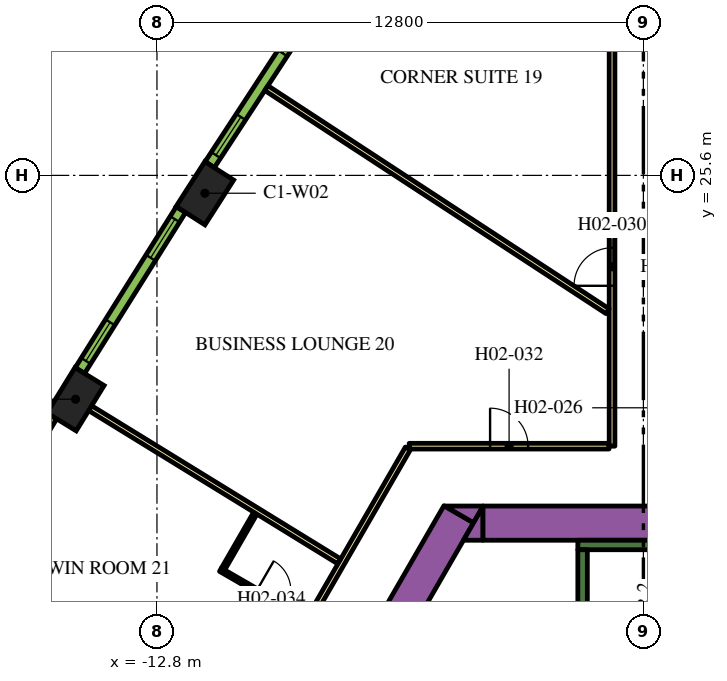
"""IFC4 building model, lengths in metres.
Left out: names, types, materials, properties, quantities, classifications, styles, units other than length and angle.
Written with IfcOpenShell. Run it as: python <this file> out.ifc"""

import sys

from ifc_helpers import new_model, si_unit, direction, frame, frame_2d, origin, origin_2d, place, context, subcontext, project, spatial, polyline, rectangle, outline, extrude, element, fill, save


model = new_model("IFC4")
c1 = context("Model", 3, precision=1e-05, world=origin(), true_north=direction((0.0, 1.0)))
c2 = subcontext(c1, "Body", "Model", "MODEL_VIEW")
j1 = project(units=[si_unit("LENGTHUNIT", "METRE"), si_unit("PLANEANGLEUNIT", "RADIAN")], contexts=[c1])
p1 = place(None, origin())
s1 = spatial("IfcSite", under=j1, at=p1, CompositionType="ELEMENT")
p2 = place(p1, origin())
s2 = spatial("IfcBuilding", under=s1, at=p2, CompositionType="ELEMENT")
p3 = place(p2, frame((0.0, 0.0, 47.1)))
s3 = spatial("IfcBuildingStorey", under=s2, at=p3, CompositionType="ELEMENT", Elevation=47.1)
for number, where, z_axis, x_axis in (
    (1, (-11.539, 25.131, 0.0), (0.0, 0.0, 1.0), (-0.539, -0.842, 0.0)),
    (2, (-14.942, 19.71, 0.0), (0.0, 0.0, 1.0), (-0.524, -0.852, 0.0)),
):
    element("IfcColumn", number, at=place(p3, frame(where, z_axis=z_axis, x_axis=x_axis)), inside=s3, PredefinedType="COLUMN", context=c2, shape_type="SweptSolid", body=[
        extrude(rectangle(XDim=1.4, YDim=0.9, at=origin_2d()), origin(), (0.0, 0.0, 1.0), 3.9),
    ])
p4 = place(p3, frame((-15.36, -1.503, 0.0), z_axis=(0.0, 0.0, 1.0), x_axis=(0.50000389221, 0.866023156604, 0.0)))
e3 = element("IfcWall", 3, at=p4, inside=s3, PredefinedType="SOLIDWALL", context=c2, shape_type="SweptSolid", body=[
    extrude(rectangle(XDim=21.0, YDim=0.9, at=frame_2d((10.5, 0.0))), origin(), (0.0, 0.0, 1.0), 3.9),
])
p5 = place(p3, origin())
e4 = element("IfcWall", 4, at=p5, inside=s3, PredefinedType="SOLIDWALL", context=c2, shape_type="SweptSolid", body=[
    extrude(outline(polyline([(-4.215, 16.9), (-4.469, 16.46), (-5.231, 16.9), (-4.215, 16.9)])), origin(), (0.0, 0.0, 1.0), 3.9),
])
p6 = place(p3, frame((-4.224, 16.45, 0.0), z_axis=(0.0, 0.0, 1.0), x_axis=(1.0, 0.0, 0.0)))
e5 = element("IfcWall", 5, at=p6, inside=s3, PredefinedType="SOLIDWALL", context=c2, shape_type="SweptSolid", body=[
    extrude(rectangle(XDim=9.488, YDim=0.9, at=frame_2d((4.744, 0.0))), origin(), (0.0, 0.0, 1.0), 3.9),
])
e6 = element("IfcWall", 6, at=p5, inside=s3, PredefinedType="SOLIDWALL", context=c2, shape_type="SweptSolid", body=[
    extrude(outline(polyline([(-4.734, 16.0), (-4.226, 16.88), (-4.226, 16.0), (-4.734, 16.0)])), origin(), (0.0, 0.0, 1.0), 3.9),
])
p7 = place(p3, frame((-1.725, 15.875, 0.0), z_axis=(0.0, 0.0, 1.0), x_axis=(1.0, 0.0, 0.0)))
e7 = element("IfcWall", 7, at=p7, inside=s3, PredefinedType="SOLIDWALL", context=c2, shape_type="SweptSolid", body=[
    extrude(rectangle(XDim=3.45, YDim=0.25, at=frame_2d((1.725, 0.0))), origin(), (0.0, 0.0, 1.0), 3.9),
])
p8 = place(p3, frame((-1.6, 8.7, 0.0), z_axis=(0.0, 0.0, 1.0), x_axis=(0.0, 1.0, 0.0)))
e8 = element("IfcWall", 8, at=p8, inside=s3, PredefinedType="SOLIDWALL", context=c2, shape_type="SweptSolid", body=[
    extrude(rectangle(XDim=7.05, YDim=0.25, at=frame_2d((3.525, 0.0))), origin(), (0.0, 0.0, 1.0), 3.9),
])
p9 = place(p3, frame((-0.825, 18.475, 0.0), z_axis=(0.0, 0.0, 1.0), x_axis=(0.0, 1.0, 0.0)))
e9 = element("IfcWall", 9, at=p9, inside=s3, PredefinedType="PARTITIONING", context=c2, shape_type="SweptSolid", body=[
    extrude(rectangle(XDim=16.224, YDim=0.15, at=frame_2d((8.112, 0.0))), origin(), (0.0, 0.0, 1.0), 2.75),
])
p10 = place(p9, frame((4.22, 0.0, 0.0)))
e10 = element("IfcOpeningElement", 10, at=p10, cuts=e9, PredefinedType="OPENING", context=c2, shape_type="SweptSolid", body=[
    extrude(rectangle(XDim=1.0, YDim=2.1, at=frame_2d((0.5, 1.05))), frame((0.0, 0.085, 0.0), z_axis=(0.0, -1.0, 0.0), x_axis=(1.0, 0.0, 0.0)), (0.0, 0.0, 1.0), 0.17),
])
p11 = place(p3, frame((-6.163, 18.475, 0.0), z_axis=(0.0, 0.0, 1.0), x_axis=(1.0, 0.0, 0.0)))
e11 = element("IfcWall", 11, at=p11, inside=s3, PredefinedType="PARTITIONING", context=c2, shape_type="SweptSolid", body=[
    extrude(rectangle(XDim=5.258, YDim=0.15, at=frame_2d((2.629, 0.0))), origin(), (0.0, 0.0, 1.0), 2.75),
])
p12 = place(p11, frame((2.129, 0.0, 0.0)))
e12 = element("IfcOpeningElement", 12, at=p12, cuts=e11, PredefinedType="OPENING", context=c2, shape_type="SweptSolid", body=[
    extrude(rectangle(XDim=1.0, YDim=2.1, at=frame_2d((0.5, 1.05))), frame((0.0, 0.085, 0.0), z_axis=(0.0, -1.0, 0.0), x_axis=(1.0, 0.0, 0.0)), (0.0, 0.0, 1.0), 0.17),
])
p13 = place(p3, frame((-19.081, -3.9, 0.0), z_axis=(0.0, 0.0, 1.0), x_axis=(0.499998313975, 0.866026377209, 0.0)))
e13 = element("IfcWall", 13, at=p13, inside=s3, PredefinedType="PARTITIONING", context=c2, shape_type="SweptSolid", body=[
    extrude(rectangle(XDim=25.766, YDim=0.15, at=frame_2d((12.883, 0.0))), origin(), (0.0, 0.0, 1.0), 2.75),
])
p14 = place(p13, frame((16.196, 0.0, 0.0)))
e14 = element("IfcOpeningElement", 14, at=p14, cuts=e13, PredefinedType="OPENING", context=c2, shape_type="SweptSolid", body=[
    extrude(rectangle(XDim=1.0, YDim=2.1, at=frame_2d((0.5, 1.05))), frame((0.0, 0.085, 0.0), z_axis=(0.0, -1.0, 0.0), x_axis=(1.0, 0.0, 0.0)), (0.0, 0.0, 1.0), 0.17),
])
p15 = place(p13, frame((14.889, 0.0, 0.0)))
e15 = element("IfcOpeningElement", 15, at=p15, cuts=e13, PredefinedType="OPENING", context=c2, shape_type="SweptSolid", body=[
    extrude(rectangle(XDim=1.0, YDim=2.1, at=frame_2d((0.5, 1.05))), frame((0.0, 0.085, 0.0), z_axis=(0.0, -1.0, 0.0), x_axis=(1.0, 0.0, 0.0)), (0.0, 0.0, 1.0), 0.17),
])
p16 = place(p13, frame((3.698, 0.0, 0.0)))
e16 = element("IfcOpeningElement", 16, at=p16, cuts=e13, PredefinedType="OPENING", context=c2, shape_type="SweptSolid", body=[
    extrude(rectangle(XDim=1.1, YDim=2.1, at=frame_2d((0.55, 1.05))), frame((0.0, 0.085, 0.0), z_axis=(0.0, -1.0, 0.0), x_axis=(1.0, 0.0, 0.0)), (0.0, 0.0, 1.0), 0.17),
])
p17 = place(p13, frame((2.392, 0.0, 0.0)))
e17 = element("IfcOpeningElement", 17, at=p17, cuts=e13, PredefinedType="OPENING", context=c2, shape_type="SweptSolid", body=[
    extrude(rectangle(XDim=1.0, YDim=2.1, at=frame_2d((0.5, 1.05))), frame((0.0, 0.085, 0.0), z_axis=(0.0, -1.0, 0.0), x_axis=(1.0, 0.0, 0.0)), (0.0, 0.0, 1.0), 0.17),
])
p18 = place(p3, frame((-14.558, 19.475, 0.0), z_axis=(0.0, 0.0, 1.0), x_axis=(0.851829455142, -0.523819223925, 0.0)))
e18 = element("IfcWall", 18, at=p18, inside=s3, PredefinedType="PARTITIONING", context=c2, shape_type="SweptSolid", body=[
    extrude(rectangle(XDim=7.688, YDim=0.15, at=frame_2d((3.844, 0.0))), origin(), (0.0, 0.0, 1.0), 2.75),
])
p19 = place(p3, frame((-9.922, 27.896, 0.0), z_axis=(0.0, 0.0, 1.0), x_axis=(0.836970816595, -0.547247523675, 0.0)))
e19 = element("IfcWall", 19, at=p19, inside=s3, PredefinedType="PARTITIONING", context=c2, shape_type="SweptSolid", body=[
    extrude(rectangle(XDim=10.729, YDim=0.15, at=frame_2d((5.364, 0.0))), origin(), (0.0, 0.0, 1.0), 2.75),
])
p20 = place(p3, frame((-11.129, 15.224, 0.0), z_axis=(0.0, 0.0, 1.0), x_axis=(0.866021400173, -0.500006934395, 0.0)))
e20 = element("IfcWall", 20, at=p20, inside=s3, PredefinedType="PARTITIONING", context=c2, shape_type="SweptSolid", body=[
    extrude(rectangle(XDim=2.6, YDim=0.1, at=frame_2d((1.3, 0.0))), origin(), (0.0, 0.0, 1.0), 2.75),
])
p21 = place(p20, frame((1.1, 0.0, 0.0)))
e21 = element("IfcOpeningElement", 21, at=p21, cuts=e20, PredefinedType="OPENING", context=c2, shape_type="SweptSolid", body=[
    extrude(rectangle(XDim=0.9, YDim=2.1, at=frame_2d((0.45, 1.05))), frame((0.0, 0.06, 0.0), z_axis=(0.0, -1.0, 0.0), x_axis=(1.0, 0.0, 0.0)), (0.0, 0.0, 1.0), 0.12),
])
p22 = place(p3, frame((-11.061, 15.242, 0.0), z_axis=(0.0, 0.0, 1.0), x_axis=(0.499976720371, 0.866038843867, 0.0)))
e22 = element("IfcWall", 22, at=p22, inside=s3, PredefinedType="PARTITIONING", context=c2, shape_type="SweptSolid", body=[
    extrude(rectangle(XDim=1.69, YDim=0.1, at=frame_2d((0.845, 0.0))), origin(), (0.0, 0.0, 1.0), 2.75),
])
p23 = place(p3, frame((-8.676, 30.068, 0.0), z_axis=(0.0, 0.0, 1.0), x_axis=(-0.547204617628, -0.836998868845, 0.0)))
e23 = element("IfcWall", 23, at=p23, inside=s3, PredefinedType="SOLIDWALL", context=c2, shape_type="SweptSolid", body=[
    extrude(rectangle(XDim=4.998, YDim=0.29, at=frame_2d((2.499, 0.0))), origin(), (0.0, 0.0, 1.0), 3.65),
])
p24 = place(p23, frame((0.297, 0.0, 0.9)))
e24 = element("IfcOpeningElement", 24, at=p24, cuts=e23, PredefinedType="OPENING", context=c2, shape_type="SweptSolid", body=[
    extrude(rectangle(XDim=1.2, YDim=2.15, at=frame_2d((0.6, 1.075))), frame((0.0, 0.155, 0.0), z_axis=(0.0, -1.0, 0.0), x_axis=(1.0, 0.0, 0.0)), (0.0, 0.0, 1.0), 0.31),
])
p25 = place(p23, frame((3.501, 0.0, 0.9)))
e25 = element("IfcOpeningElement", 25, at=p25, cuts=e23, PredefinedType="OPENING", context=c2, shape_type="SweptSolid", body=[
    extrude(rectangle(XDim=1.2, YDim=2.15, at=frame_2d((0.6, 1.075))), frame((0.0, 0.155, 0.0), z_axis=(0.0, -1.0, 0.0), x_axis=(1.0, 0.0, 0.0)), (0.0, 0.0, 1.0), 0.31),
])
p26 = place(p3, frame((-12.17, 24.699, 0.0), z_axis=(0.0, 0.0, 1.0), x_axis=(-0.531688286542, -0.846940119462, 0.0)))
e26 = element("IfcWall", 26, at=p26, inside=s3, PredefinedType="SOLIDWALL", context=c2, shape_type="SweptSolid", body=[
    extrude(rectangle(XDim=4.998, YDim=0.29, at=frame_2d((2.499, 0.0))), origin(), (0.0, 0.0, 1.0), 3.65),
])
p27 = place(p26, frame((0.297, 0.0, 0.9)))
e27 = element("IfcOpeningElement", 27, at=p27, cuts=e26, PredefinedType="OPENING", context=c2, shape_type="SweptSolid", body=[
    extrude(rectangle(XDim=1.2, YDim=2.15, at=frame_2d((0.6, 1.075))), frame((0.0, 0.155, 0.0), z_axis=(0.0, -1.0, 0.0), x_axis=(1.0, 0.0, 0.0)), (0.0, 0.0, 1.0), 0.31),
])
p28 = place(p26, frame((3.501, 0.0, 0.9)))
e28 = element("IfcOpeningElement", 28, at=p28, cuts=e26, PredefinedType="OPENING", context=c2, shape_type="SweptSolid", body=[
    extrude(rectangle(XDim=1.2, YDim=2.15, at=frame_2d((0.6, 1.075))), frame((0.0, 0.155, 0.0), z_axis=(0.0, -1.0, 0.0), x_axis=(1.0, 0.0, 0.0)), (0.0, 0.0, 1.0), 0.31),
])
p29 = place(p3, frame((-15.564, 19.267, 0.0), z_axis=(0.0, 0.0, 1.0), x_axis=(-0.515938796285, -0.856625448191, 0.0)))
e29 = element("IfcWall", 29, at=p29, inside=s3, PredefinedType="SOLIDWALL", context=c2, shape_type="SweptSolid", body=[
    extrude(rectangle(XDim=4.998, YDim=0.29, at=frame_2d((2.499, 0.0))), origin(), (0.0, 0.0, 1.0), 3.65),
])
p30 = place(p29, frame((0.297, 0.0, 0.9)))
e30 = element("IfcOpeningElement", 30, at=p30, cuts=e29, PredefinedType="OPENING", context=c2, shape_type="SweptSolid", body=[
    extrude(rectangle(XDim=1.2, YDim=2.15, at=frame_2d((0.6, 1.075))), frame((0.0, 0.155, 0.0), z_axis=(0.0, -1.0, 0.0), x_axis=(1.0, 0.0, 0.0)), (0.0, 0.0, 1.0), 0.31),
])
p31 = place(p29, frame((3.501, 0.0, 0.9)))
e31 = element("IfcOpeningElement", 31, at=p31, cuts=e29, PredefinedType="OPENING", context=c2, shape_type="SweptSolid", body=[
    extrude(rectangle(XDim=1.2, YDim=2.15, at=frame_2d((0.6, 1.075))), frame((0.0, 0.155, 0.0), z_axis=(0.0, -1.0, 0.0), x_axis=(1.0, 0.0, 0.0)), (0.0, 0.0, 1.0), 0.31),
])
p32 = place(p10, origin())
e32 = element("IfcDoor", 32, at=p32, inside=s3, OperationType="SINGLE_SWING_LEFT", PredefinedType="DOOR", context=c2, shape_type="SweptSolid", body=[
    extrude(rectangle(XDim=1.0, YDim=2.1, at=frame_2d((0.5, 1.05))), frame((0.0, 0.025, 0.0), z_axis=(0.0, -1.0, 0.0), x_axis=(1.0, 0.0, 0.0)), (0.0, 0.0, 1.0), 0.05),
])
fill(e10, e32)
p33 = place(p12, origin())
e33 = element("IfcDoor", 33, at=p33, inside=s3, OperationType="SINGLE_SWING_RIGHT", PredefinedType="DOOR", context=c2, shape_type="SweptSolid", body=[
    extrude(rectangle(XDim=1.0, YDim=2.1, at=frame_2d((0.5, 1.05))), frame((0.0, 0.025, 0.0), z_axis=(0.0, -1.0, 0.0), x_axis=(1.0, 0.0, 0.0)), (0.0, 0.0, 1.0), 0.05),
])
fill(e12, e33)
p34 = place(p21, origin())
e34 = element("IfcDoor", 34, at=p34, inside=s3, OperationType="SINGLE_SWING_RIGHT", PredefinedType="DOOR", context=c2, shape_type="SweptSolid", body=[
    extrude(rectangle(XDim=0.9, YDim=2.1, at=frame_2d((0.45, 1.05))), frame((0.0, 0.025, 0.0), z_axis=(0.0, -1.0, 0.0), x_axis=(1.0, 0.0, 0.0)), (0.0, 0.0, 1.0), 0.05),
])
fill(e21, e34)
p35 = place(p24, origin())
e35 = element("IfcWindow", 35, at=p35, inside=s3, PartitioningType="DOUBLE_PANEL_VERTICAL", PredefinedType="WINDOW", context=c2, shape_type="SweptSolid", body=[
    extrude(rectangle(XDim=1.2, YDim=2.15, at=frame_2d((0.6, 1.075))), frame((0.0, 0.015, 0.0), z_axis=(0.0, -1.0, 0.0), x_axis=(1.0, 0.0, 0.0)), (0.0, 0.0, 1.0), 0.06),
])
fill(e24, e35)
p36 = place(p25, origin())
e36 = element("IfcWindow", 36, at=p36, inside=s3, PartitioningType="DOUBLE_PANEL_VERTICAL", PredefinedType="WINDOW", context=c2, shape_type="SweptSolid", body=[
    extrude(rectangle(XDim=1.2, YDim=2.15, at=frame_2d((0.6, 1.075))), frame((0.0, 0.015, 0.0), z_axis=(0.0, -1.0, 0.0), x_axis=(1.0, 0.0, 0.0)), (0.0, 0.0, 1.0), 0.06),
])
fill(e25, e36)
p37 = place(p27, origin())
e37 = element("IfcWindow", 37, at=p37, inside=s3, PartitioningType="DOUBLE_PANEL_VERTICAL", PredefinedType="WINDOW", context=c2, shape_type="SweptSolid", body=[
    extrude(rectangle(XDim=1.2, YDim=2.15, at=frame_2d((0.6, 1.075))), frame((0.0, 0.015, 0.0), z_axis=(0.0, -1.0, 0.0), x_axis=(1.0, 0.0, 0.0)), (0.0, 0.0, 1.0), 0.06),
])
fill(e27, e37)
p38 = place(p28, origin())
e38 = element("IfcWindow", 38, at=p38, inside=s3, PartitioningType="DOUBLE_PANEL_VERTICAL", PredefinedType="WINDOW", context=c2, shape_type="SweptSolid", body=[
    extrude(rectangle(XDim=1.2, YDim=2.15, at=frame_2d((0.6, 1.075))), frame((0.0, 0.015, 0.0), z_axis=(0.0, -1.0, 0.0), x_axis=(1.0, 0.0, 0.0)), (0.0, 0.0, 1.0), 0.06),
])
fill(e28, e38)
save(model, sys.argv[1])
